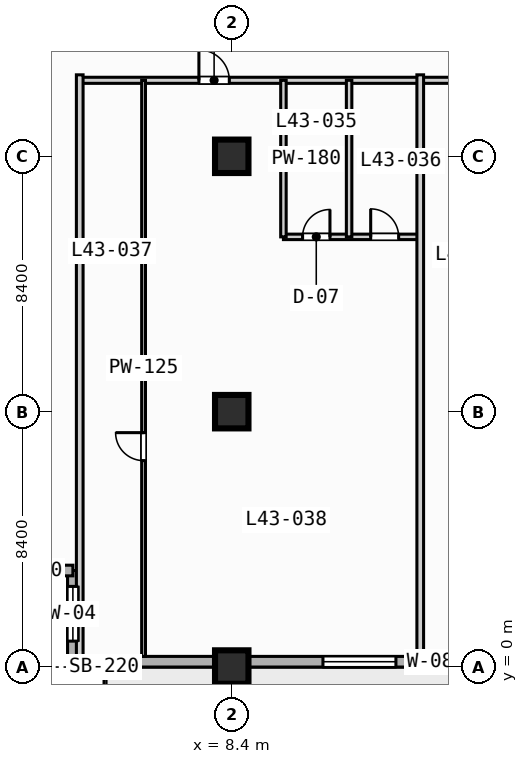
"""IFC4 building model, lengths in metres.
Left out: names, types, materials, properties, quantities, classifications, styles, units other than length and angle.
Written with IfcOpenShell. Run it as: python <this file> out.ifc"""

import sys

from ifc_helpers import new_model, si_unit, direction, frame, frame_2d, origin, origin_2d, place, context, subcontext, project, spatial, rectangle, extrude, element, fill, save


model = new_model("IFC4")
c1 = context("Model", 3, precision=1e-05, world=origin(), true_north=direction((0.0, 1.0)))
c2 = subcontext(c1, "Body", "Model", "MODEL_VIEW")
j1 = project(units=[si_unit("LENGTHUNIT", "METRE"), si_unit("PLANEANGLEUNIT", "RADIAN")], contexts=[c1])
p1 = place(None, origin())
s1 = spatial("IfcSite", under=j1, at=p1, CompositionType="ELEMENT")
p2 = place(p1, origin())
s2 = spatial("IfcBuilding", under=s1, at=p2, CompositionType="ELEMENT")
p3 = place(p2, frame((0.0, 0.0, 179.1)))
s3 = spatial("IfcBuildingStorey", under=s2, at=p3, CompositionType="ELEMENT", Elevation=179.1)
for number, where, z_axis, x_axis in (
    (1, (8.4, 0.0, 0.0), (0.0, 0.0, 1.0), (1.0, 0.0, 0.0)),
    (2, (8.4, 8.4, 0.0), (0.0, 0.0, 1.0), (1.0, 0.0, 0.0)),
    (3, (8.4, 16.8, 0.0), (0.0, 0.0, 1.0), (1.0, 0.0, 0.0)),
):
    element("IfcColumn", number, at=place(p3, frame(where, z_axis=z_axis, x_axis=x_axis)), inside=s3, PredefinedType="COLUMN", context=c2, shape_type="SweptSolid", body=[
        extrude(rectangle(XDim=1.1, YDim=1.1, at=origin_2d()), origin(), (0.0, 0.0, 1.0), 3.7),
    ])
p4 = place(p3, frame((3.175, 0.175, 0.0), z_axis=(0.0, 0.0, 1.0), x_axis=(0.0, 1.0, 0.0)))
e4 = element("IfcWall", 4, at=p4, inside=s3, PredefinedType="STANDARD", context=c2, shape_type="SweptSolid", body=[
    extrude(rectangle(XDim=3.0, YDim=0.35, at=frame_2d((1.5, 0.0))), origin(), (0.0, 0.0, 1.0), 3.47),
])
p5 = place(p4, frame((0.677, 0.0, 0.85)))
e5 = element("IfcOpeningElement", 5, at=p5, cuts=e4, PredefinedType="OPENING", context=c2, shape_type="SweptSolid", body=[
    extrude(rectangle(XDim=1.8, YDim=1.8, at=frame_2d((0.9, 0.9))), frame((0.0, 0.185, 0.0), z_axis=(0.0, -1.0, 0.0), x_axis=(1.0, 0.0, 0.0)), (0.0, 0.0, 1.0), 0.37),
])
p6 = place(p3, frame((3.175, 3.175, 0.0), z_axis=(0.0, 0.0, 1.0), x_axis=(-1.0, 0.0, 0.0)))
e6 = element("IfcWall", 6, at=p6, inside=s3, PredefinedType="STANDARD", context=c2, shape_type="SweptSolid", body=[
    extrude(rectangle(XDim=3.0, YDim=0.35, at=frame_2d((1.5, 0.0))), origin(), (0.0, 0.0, 1.0), 3.47),
])
p7 = place(p3, frame((72.425, 0.175, 0.0), z_axis=(0.0, 0.0, 1.0), x_axis=(-1.0, 0.0, 0.0)))
e7 = element("IfcWall", 7, at=p7, inside=s3, PredefinedType="STANDARD", context=c2, shape_type="SweptSolid", body=[
    extrude(rectangle(XDim=69.25, YDim=0.35, at=frame_2d((34.625, 0.0))), origin(), (0.0, 0.0, 1.0), 3.47),
])
p8 = place(p7, frame((50.725, 0.0, 0.0)))
e8 = element("IfcOpeningElement", 8, at=p8, cuts=e7, PredefinedType="OPENING", context=c2, shape_type="SweptSolid", body=[
    extrude(rectangle(XDim=1.4, YDim=2.2, at=frame_2d((0.7, 1.1))), frame((0.0, 0.185, 0.0), z_axis=(0.0, -1.0, 0.0), x_axis=(1.0, 0.0, 0.0)), (0.0, 0.0, 1.0), 0.37),
])
p9 = place(p7, frame((58.625, 0.0, 0.85)))
e9 = element("IfcOpeningElement", 9, at=p9, cuts=e7, PredefinedType="OPENING", context=c2, shape_type="SweptSolid", body=[
    extrude(rectangle(XDim=2.4, YDim=1.95, at=frame_2d((1.2, 0.975))), frame((0.0, 0.185, 0.0), z_axis=(0.0, -1.0, 0.0), x_axis=(1.0, 0.0, 0.0)), (0.0, 0.0, 1.0), 0.37),
])
p10 = place(p7, frame((41.825, 0.0, 0.85)))
e10 = element("IfcOpeningElement", 10, at=p10, cuts=e7, PredefinedType="OPENING", context=c2, shape_type="SweptSolid", body=[
    extrude(rectangle(XDim=2.4, YDim=1.95, at=frame_2d((1.2, 0.975))), frame((0.0, 0.185, 0.0), z_axis=(0.0, -1.0, 0.0), x_axis=(1.0, 0.0, 0.0)), (0.0, 0.0, 1.0), 0.37),
])
p11 = place(p7, frame((33.725, 0.0, 0.85)))
e11 = element("IfcOpeningElement", 11, at=p11, cuts=e7, PredefinedType="OPENING", context=c2, shape_type="SweptSolid", body=[
    extrude(rectangle(XDim=1.8, YDim=1.8, at=frame_2d((0.9, 0.9))), frame((0.0, 0.185, 0.0), z_axis=(0.0, -1.0, 0.0), x_axis=(1.0, 0.0, 0.0)), (0.0, 0.0, 1.0), 0.37),
])
p12 = place(p7, frame((25.025, 0.0, 0.85)))
e12 = element("IfcOpeningElement", 12, at=p12, cuts=e7, PredefinedType="OPENING", context=c2, shape_type="SweptSolid", body=[
    extrude(rectangle(XDim=2.4, YDim=1.95, at=frame_2d((1.2, 0.975))), frame((0.0, 0.185, 0.0), z_axis=(0.0, -1.0, 0.0), x_axis=(1.0, 0.0, 0.0)), (0.0, 0.0, 1.0), 0.37),
])
p13 = place(p7, frame((67.075, 0.0, 0.85)))
e13 = element("IfcOpeningElement", 13, at=p13, cuts=e7, PredefinedType="OPENING", context=c2, shape_type="SweptSolid", body=[
    extrude(rectangle(XDim=1.8, YDim=1.8, at=frame_2d((0.9, 0.9))), frame((0.0, 0.185, 0.0), z_axis=(0.0, -1.0, 0.0), x_axis=(1.0, 0.0, 0.0)), (0.0, 0.0, 1.0), 0.37),
])
p14 = place(p7, frame((56.39, 0.0, 0.85)))
e14 = element("IfcOpeningElement", 14, at=p14, cuts=e7, PredefinedType="OPENING", context=c2, shape_type="SweptSolid", body=[
    extrude(rectangle(XDim=0.72, YDim=1.8, at=frame_2d((0.36, 0.9))), frame((0.0, 0.185, 0.0), z_axis=(0.0, -1.0, 0.0), x_axis=(1.0, 0.0, 0.0)), (0.0, 0.0, 1.0), 0.37),
])
p15 = place(p7, frame((9.075, 0.0, 0.85)))
e15 = element("IfcOpeningElement", 15, at=p15, cuts=e7, PredefinedType="OPENING", context=c2, shape_type="SweptSolid", body=[
    extrude(rectangle(XDim=1.8, YDim=1.8, at=frame_2d((0.9, 0.9))), frame((0.0, 0.185, 0.0), z_axis=(0.0, -1.0, 0.0), x_axis=(1.0, 0.0, 0.0)), (0.0, 0.0, 1.0), 0.37),
])
p16 = place(p7, frame((2.675, 0.0, 0.85)))
e16 = element("IfcOpeningElement", 16, at=p16, cuts=e7, PredefinedType="OPENING", context=c2, shape_type="SweptSolid", body=[
    extrude(rectangle(XDim=1.8, YDim=1.8, at=frame_2d((0.9, 0.9))), frame((0.0, 0.185, 0.0), z_axis=(0.0, -1.0, 0.0), x_axis=(1.0, 0.0, 0.0)), (0.0, 0.0, 1.0), 0.37),
])
p17 = place(p3, frame((3.4, 19.3, 0.0), z_axis=(0.0, 0.0, 1.0), x_axis=(1.0, 0.0, 0.0)))
e17 = element("IfcWall", 17, at=p17, inside=s3, PredefinedType="PARTITIONING", context=c2, shape_type="SweptSolid", body=[
    extrude(rectangle(XDim=35.8, YDim=0.2, at=frame_2d((17.9, 0.0))), origin(), (0.0, 0.0, 1.0), 3.47),
])
p18 = place(p17, frame((3.92, 0.0, 0.0)))
e18 = element("IfcOpeningElement", 18, at=p18, cuts=e17, PredefinedType="OPENING", context=c2, shape_type="SweptSolid", body=[
    extrude(rectangle(XDim=1.0, YDim=2.15, at=frame_2d((0.5, 1.075))), frame((0.0, 0.11, 0.0), z_axis=(0.0, -1.0, 0.0), x_axis=(1.0, 0.0, 0.0)), (0.0, 0.0, 1.0), 0.22),
])
p19 = place(p17, frame((14.945, 0.0, 0.0)))
e19 = element("IfcOpeningElement", 19, at=p19, cuts=e17, PredefinedType="OPENING", context=c2, shape_type="SweptSolid", body=[
    extrude(rectangle(XDim=1.0, YDim=2.15, at=frame_2d((0.5, 1.075))), frame((0.0, 0.11, 0.0), z_axis=(0.0, -1.0, 0.0), x_axis=(1.0, 0.0, 0.0)), (0.0, 0.0, 1.0), 0.22),
])
p20 = place(p17, frame((22.92, 0.0, 0.0)))
e20 = element("IfcOpeningElement", 20, at=p20, cuts=e17, PredefinedType="OPENING", context=c2, shape_type="SweptSolid", body=[
    extrude(rectangle(XDim=1.0, YDim=2.15, at=frame_2d((0.5, 1.075))), frame((0.0, 0.11, 0.0), z_axis=(0.0, -1.0, 0.0), x_axis=(1.0, 0.0, 0.0)), (0.0, 0.0, 1.0), 0.22),
])
p21 = place(p17, frame((29.82, 0.0, 0.0)))
e21 = element("IfcOpeningElement", 21, at=p21, cuts=e17, PredefinedType="OPENING", context=c2, shape_type="SweptSolid", body=[
    extrude(rectangle(XDim=1.0, YDim=2.15, at=frame_2d((0.5, 1.075))), frame((0.0, 0.11, 0.0), z_axis=(0.0, -1.0, 0.0), x_axis=(1.0, 0.0, 0.0)), (0.0, 0.0, 1.0), 0.22),
])
p22 = place(p3, frame((3.4, 0.2, 0.0), z_axis=(0.0, 0.0, 1.0), x_axis=(0.0, 1.0, 0.0)))
e22 = element("IfcWall", 22, at=p22, inside=s3, PredefinedType="PARTITIONING", context=c2, shape_type="SweptSolid", body=[
    extrude(rectangle(XDim=19.28, YDim=0.22, at=frame_2d((9.64, 0.0))), origin(), (0.0, 0.0, 1.0), 3.47),
])
p23 = place(p3, frame((10.1, 14.15, 0.0), z_axis=(0.0, 0.0, 1.0), x_axis=(1.0, 0.0, 0.0)))
e23 = element("IfcWall", 23, at=p23, inside=s3, PredefinedType="PLUMBINGWALL", context=c2, shape_type="SweptSolid", body=[
    extrude(rectangle(XDim=4.5, YDim=0.18, at=frame_2d((2.25, 0.0))), origin(), (0.0, 0.0, 1.0), 3.47),
])
p24 = place(p23, frame((0.63, 0.0, 0.0)))
e24 = element("IfcOpeningElement", 24, at=p24, cuts=e23, PredefinedType="OPENING", context=c2, shape_type="SweptSolid", body=[
    extrude(rectangle(XDim=0.9, YDim=2.1, at=frame_2d((0.45, 1.05))), frame((0.0, 0.1, 0.0), z_axis=(0.0, -1.0, 0.0), x_axis=(1.0, 0.0, 0.0)), (0.0, 0.0, 1.0), 0.2),
])
p25 = place(p23, frame((2.87, 0.0, 0.0)))
e25 = element("IfcOpeningElement", 25, at=p25, cuts=e23, PredefinedType="OPENING", context=c2, shape_type="SweptSolid", body=[
    extrude(rectangle(XDim=0.92, YDim=2.1, at=frame_2d((0.46, 1.05))), frame((0.0, 0.1, 0.0), z_axis=(0.0, -1.0, 0.0), x_axis=(1.0, 0.0, 0.0)), (0.0, 0.0, 1.0), 0.2),
])
for number, where, z_axis, x_axis in (
    (26, (10.1, 14.15, 0.0), (0.0, 0.0, 1.0), (0.0, 1.0, 0.0)),
    (27, (12.26, 14.15, 0.0), (0.0, 0.0, 1.0), (0.0, 1.0, 0.0)),
):
    element("IfcWall", number, at=place(p3, frame(where, z_axis=z_axis, x_axis=x_axis)), inside=s3, PredefinedType="PLUMBINGWALL", context=c2, shape_type="SweptSolid", body=[
        extrude(rectangle(XDim=5.15, YDim=0.18, at=frame_2d((2.575, 0.0))), origin(), (0.0, 0.0, 1.0), 3.47),
    ])
p26 = place(p3, frame((5.5, 0.35, 0.0), z_axis=(0.0, 0.0, 1.0), x_axis=(0.0, 1.0, 0.0)))
e28 = element("IfcWall", 28, at=p26, inside=s3, PredefinedType="PARTITIONING", context=c2, shape_type="SweptSolid", body=[
    extrude(rectangle(XDim=18.95, YDim=0.125, at=frame_2d((9.475, 0.0))), origin(), (0.0, 0.0, 1.0), 3.47),
])
p27 = place(p26, frame((6.44, 0.0, 0.0)))
e29 = element("IfcOpeningElement", 29, at=p27, cuts=e28, PredefinedType="OPENING", context=c2, shape_type="SweptSolid", body=[
    extrude(rectangle(XDim=0.92, YDim=2.1, at=frame_2d((0.46, 1.05))), frame((0.0, 0.073, 0.0), z_axis=(0.0, -1.0, 0.0), x_axis=(1.0, 0.0, 0.0)), (0.0, 0.0, 1.0), 0.145),
])
p28 = place(p3, frame((14.6, 0.2, 0.0), z_axis=(0.0, 0.0, 1.0), x_axis=(0.0, 1.0, 0.0)))
e30 = element("IfcWall", 30, at=p28, inside=s3, PredefinedType="PARTITIONING", context=c2, shape_type="SweptSolid", body=[
    extrude(rectangle(XDim=19.28, YDim=0.22, at=frame_2d((9.64, 0.0))), origin(), (0.0, 0.0, 1.0), 3.47),
])
p29 = place(p5, origin())
e31 = element("IfcWindow", 31, at=p29, inside=s3, PartitioningType="SINGLE_PANEL", PredefinedType="WINDOW", context=c2, shape_type="SweptSolid", body=[
    extrude(rectangle(XDim=1.8, YDim=1.8, at=frame_2d((0.9, 0.9))), frame((0.0, 0.03, 0.0), z_axis=(0.0, -1.0, 0.0), x_axis=(1.0, 0.0, 0.0)), (0.0, 0.0, 1.0), 0.06),
])
fill(e5, e31)
p30 = place(p9, origin())
e32 = element("IfcWindow", 32, at=p30, inside=s3, PartitioningType="SINGLE_PANEL", PredefinedType="WINDOW", context=c2, shape_type="SweptSolid", body=[
    extrude(rectangle(XDim=2.4, YDim=1.95, at=frame_2d((1.2, 0.975))), frame((0.0, 0.03, 0.0), z_axis=(0.0, -1.0, 0.0), x_axis=(1.0, 0.0, 0.0)), (0.0, 0.0, 1.0), 0.06),
])
fill(e9, e32)
p31 = place(p13, origin())
e33 = element("IfcWindow", 33, at=p31, inside=s3, PartitioningType="SINGLE_PANEL", PredefinedType="WINDOW", context=c2, shape_type="SweptSolid", body=[
    extrude(rectangle(XDim=1.8, YDim=1.8, at=frame_2d((0.9, 0.9))), frame((0.0, 0.03, 0.0), z_axis=(0.0, -1.0, 0.0), x_axis=(1.0, 0.0, 0.0)), (0.0, 0.0, 1.0), 0.06),
])
fill(e13, e33)
p32 = place(p14, origin())
e34 = element("IfcWindow", 34, at=p32, inside=s3, PartitioningType="SINGLE_PANEL", PredefinedType="WINDOW", context=c2, shape_type="SweptSolid", body=[
    extrude(rectangle(XDim=0.72, YDim=1.8, at=frame_2d((0.36, 0.9))), frame((0.0, 0.03, 0.0), z_axis=(0.0, -1.0, 0.0), x_axis=(1.0, 0.0, 0.0)), (0.0, 0.0, 1.0), 0.06),
])
fill(e14, e34)
p33 = place(p18, origin())
e35 = element("IfcDoor", 35, at=p33, inside=s3, OperationType="SINGLE_SWING_LEFT", PredefinedType="DOOR", context=c2, shape_type="SweptSolid", body=[
    extrude(rectangle(XDim=1.0, YDim=2.15, at=frame_2d((0.5, 1.075))), frame((0.0, 0.025, 0.0), z_axis=(0.0, -1.0, 0.0), x_axis=(1.0, 0.0, 0.0)), (0.0, 0.0, 1.0), 0.05),
])
fill(e18, e35)
p34 = place(p24, origin())
e36 = element("IfcDoor", 36, at=p34, inside=s3, OperationType="SINGLE_SWING_RIGHT", PredefinedType="DOOR", context=c2, shape_type="SweptSolid", body=[
    extrude(rectangle(XDim=0.9, YDim=2.1, at=frame_2d((0.45, 1.05))), frame((0.0, 0.025, 0.0), z_axis=(0.0, -1.0, 0.0), x_axis=(1.0, 0.0, 0.0)), (0.0, 0.0, 1.0), 0.05),
])
fill(e24, e36)
p35 = place(p25, origin())
e37 = element("IfcDoor", 37, at=p35, inside=s3, OperationType="SINGLE_SWING_LEFT", PredefinedType="DOOR", context=c2, shape_type="SweptSolid", body=[
    extrude(rectangle(XDim=0.92, YDim=2.1, at=frame_2d((0.46, 1.05))), frame((0.0, 0.025, 0.0), z_axis=(0.0, -1.0, 0.0), x_axis=(1.0, 0.0, 0.0)), (0.0, 0.0, 1.0), 0.05),
])
fill(e25, e37)
p36 = place(p27, origin())
e38 = element("IfcDoor", 38, at=p36, inside=s3, OperationType="SINGLE_SWING_RIGHT", PredefinedType="DOOR", context=c2, shape_type="SweptSolid", body=[
    extrude(rectangle(XDim=0.92, YDim=2.1, at=frame_2d((0.46, 1.05))), frame((0.0, 0.025, 0.0), z_axis=(0.0, -1.0, 0.0), x_axis=(1.0, 0.0, 0.0)), (0.0, 0.0, 1.0), 0.05),
])
fill(e29, e38)
save(model, sys.argv[1])
